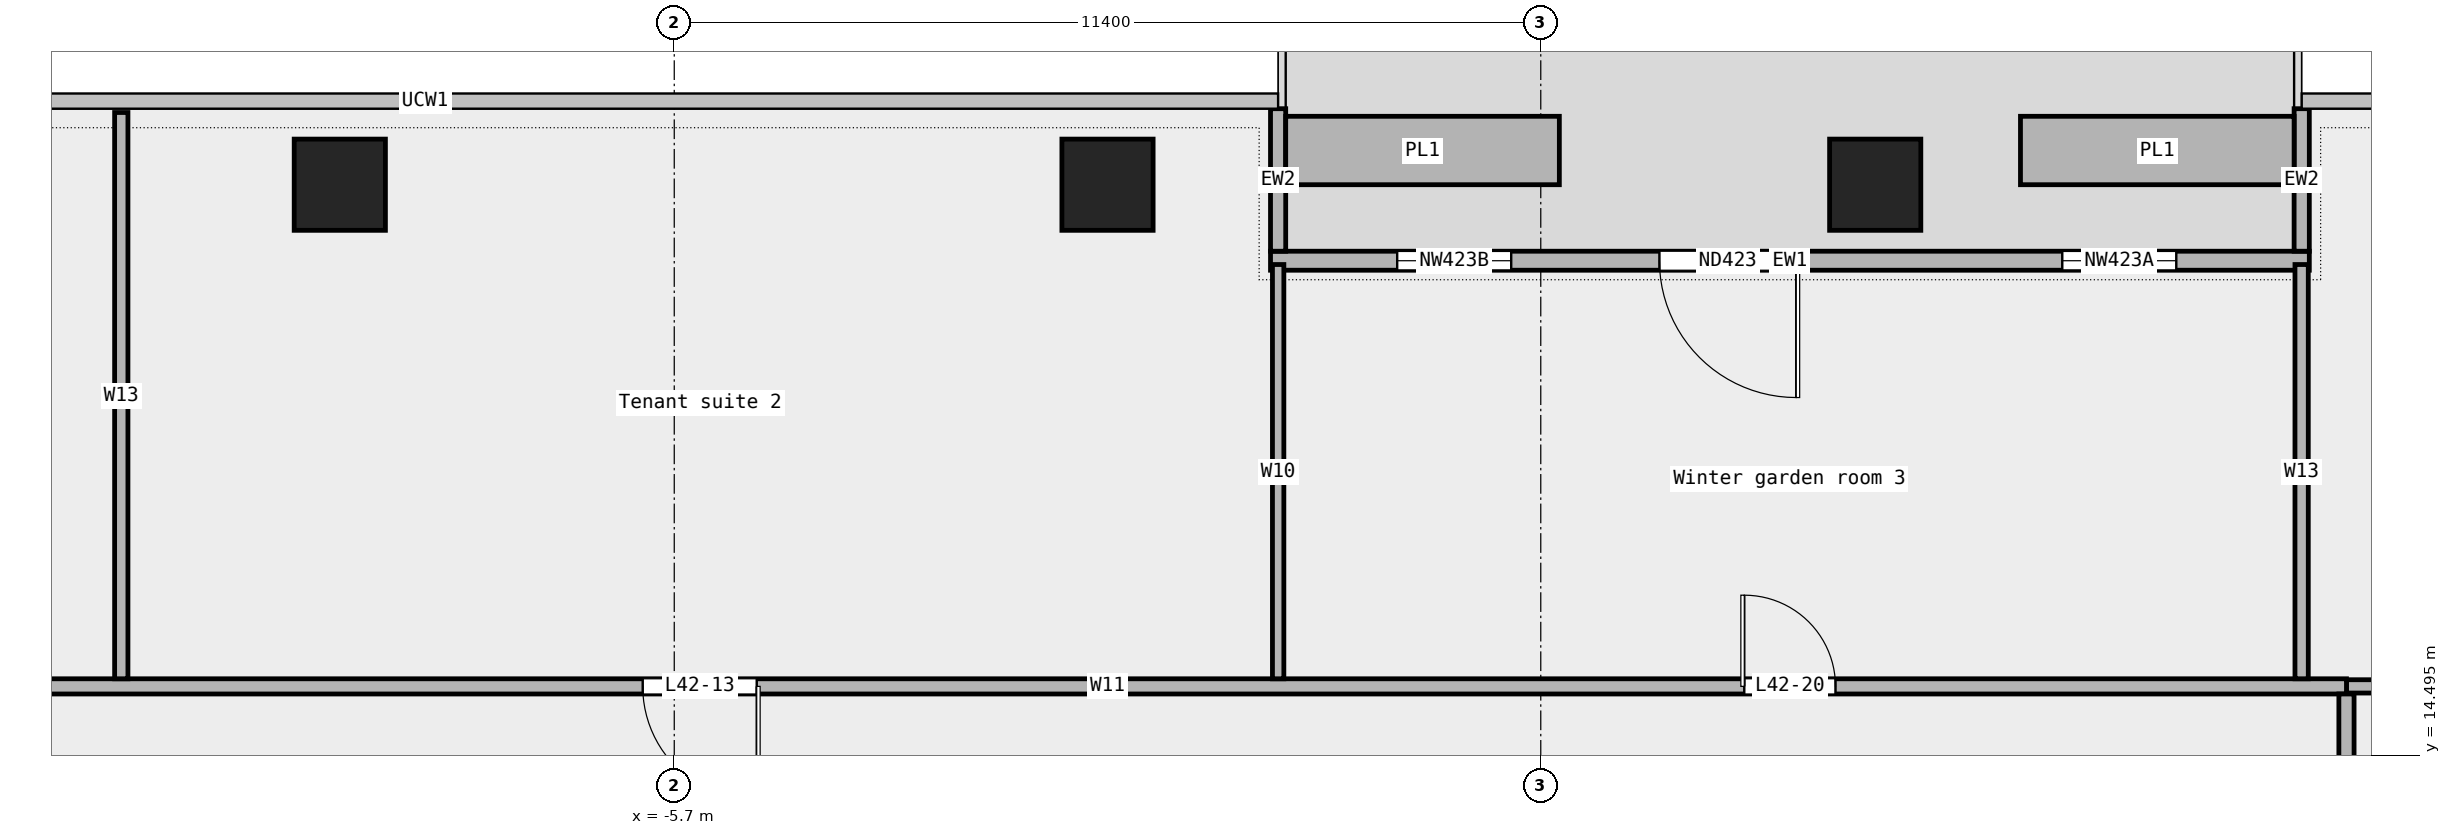
"""IFC4 building model, lengths in metres.
Left out: names, types, materials, properties, quantities, classifications, styles, units other than length and angle.
Written with IfcOpenShell. Run it as: python <this file> out.ifc"""

import sys

from ifc_helpers import new_model, si_unit, direction, frame, frame_2d, origin, origin_2d, place, context, subcontext, project, spatial, rectangle, extrude, element, fill, save


model = new_model("IFC4")
c1 = context("Model", 3, precision=1e-05, world=origin(), true_north=direction((0.0, 1.0)))
c2 = subcontext(c1, "Body", "Model", "MODEL_VIEW")
j1 = project(units=[si_unit("LENGTHUNIT", "METRE"), si_unit("PLANEANGLEUNIT", "RADIAN")], contexts=[c1])
p1 = place(None, origin())
s1 = spatial("IfcSite", under=j1, at=p1, CompositionType="ELEMENT")
p2 = place(p1, origin())
s2 = spatial("IfcBuilding", under=s1, at=p2, CompositionType="ELEMENT")
p3 = place(p2, frame((0.0, 0.0, 201.0)))
s3 = spatial("IfcBuildingStorey", under=s2, at=p3, CompositionType="ELEMENT", Elevation=201.0)
for number, where, z_axis, x_axis in (
    (1, (10.1, 22.0, 0.0), (0.0, 0.0, 1.0), (1.0, 0.0, 0.0)),
    (2, (0.0, 22.0, 0.0), (0.0, 0.0, 1.0), (1.0, 0.0, 0.0)),
    (3, (-10.1, 22.0, 0.0), (0.0, 0.0, 1.0), (1.0, 0.0, 0.0)),
):
    element("IfcColumn", number, at=place(p3, frame(where, z_axis=z_axis, x_axis=x_axis)), inside=s3, PredefinedType="COLUMN", context=c2, shape_type="SweptSolid", body=[
        extrude(rectangle(XDim=1.2, YDim=1.2, at=origin_2d()), origin(), (0.0, 0.0, 1.0), 3.4),
    ])
p4 = place(p3, frame((15.811, 21.0, 0.0), z_axis=(0.0, 0.0, 1.0), x_axis=(-1.0, 0.0, 0.0)))
e4 = element("IfcWall", 4, at=p4, inside=s3, PredefinedType="STANDARD", context=c2, shape_type="SweptSolid", body=[
    extrude(rectangle(XDim=13.667, YDim=0.25, at=frame_2d((6.833, 0.0))), origin(), (0.0, 0.0, 1.0), 3.4),
])
p5 = place(p4, frame((1.75, 0.0, 0.45)))
e5 = element("IfcOpeningElement", 5, at=p5, cuts=e4, PredefinedType="OPENING", context=c2, shape_type="SweptSolid", body=[
    extrude(rectangle(XDim=1.5, YDim=2.4, at=frame_2d((0.75, 1.2))), frame((0.0, 0.137, 0.0), z_axis=(0.0, -1.0, 0.0), x_axis=(1.0, 0.0, 0.0)), (0.0, 0.0, 1.0), 0.274),
])
p6 = place(p4, frame((6.75, 0.0, 0.0)))
e6 = element("IfcOpeningElement", 6, at=p6, cuts=e4, PredefinedType="OPENING", context=c2, shape_type="SweptSolid", body=[
    extrude(rectangle(XDim=1.8, YDim=2.4, at=frame_2d((0.9, 1.2))), frame((0.0, 0.137, 0.0), z_axis=(0.0, -1.0, 0.0), x_axis=(1.0, 0.0, 0.0)), (0.0, 0.0, 1.0), 0.274),
])
p7 = place(p4, frame((10.5, 0.0, 0.45)))
e7 = element("IfcOpeningElement", 7, at=p7, cuts=e4, PredefinedType="OPENING", context=c2, shape_type="SweptSolid", body=[
    extrude(rectangle(XDim=1.5, YDim=2.4, at=frame_2d((0.75, 1.2))), frame((0.0, 0.137, 0.0), z_axis=(0.0, -1.0, 0.0), x_axis=(1.0, 0.0, 0.0)), (0.0, 0.0, 1.0), 0.274),
])
for number, where, z_axis, x_axis in (
    (8, (15.711, 23.0, 0.0), (0.0, 0.0, 1.0), (0.0, -1.0, 0.0)),
    (9, (2.244, 23.0, 0.0), (0.0, 0.0, 1.0), (0.0, -1.0, 0.0)),
):
    element("IfcWall", number, at=place(p3, frame(where, z_axis=z_axis, x_axis=x_axis)), inside=s3, PredefinedType="STANDARD", context=c2, shape_type="SweptSolid", body=[
        extrude(rectangle(XDim=1.875, YDim=0.2, at=frame_2d((0.938, 0.0))), origin(), (0.0, 0.0, 1.0), 3.4),
    ])
for number, where, z_axis, x_axis in (
    (10, (15.611, 22.45, 0.0), (0.0, 0.0, 1.0), (-1.0, 0.0, 0.0)),
    (11, (5.944, 22.45, 0.0), (0.0, 0.0, 1.0), (-1.0, 0.0, 0.0)),
):
    element("IfcWall", number, at=place(p3, frame(where, z_axis=z_axis, x_axis=x_axis)), inside=s3, PredefinedType="STANDARD", context=c2, shape_type="SweptSolid", body=[
        extrude(rectangle(XDim=3.6, YDim=0.9, at=frame_2d((1.8, 0.0))), origin(), (0.0, 0.0, 1.0), 0.7),
    ])
p8 = place(p3, frame((16.3, 15.4, 0.0), z_axis=(0.0, 0.0, 1.0), x_axis=(1.0, 0.0, 0.0)))
e12 = element("IfcWall", 12, at=p8, inside=s3, PredefinedType="PARTITIONING", context=c2, shape_type="SweptSolid", body=[
    extrude(rectangle(XDim=3.6, YDim=0.175, at=frame_2d((1.8, 0.0))), origin(), (0.0, 0.0, 1.0), 3.4),
])
p9 = place(p3, frame((-16.3, 15.4, 0.0), z_axis=(0.0, 0.0, 1.0), x_axis=(1.0, 0.0, 0.0)))
e13 = element("IfcWall", 13, at=p9, inside=s3, PredefinedType="PARTITIONING", context=c2, shape_type="SweptSolid", body=[
    extrude(rectangle(XDim=32.6, YDim=0.2, at=frame_2d((16.3, 0.0))), origin(), (0.0, 0.0, 1.0), 3.4),
])
p10 = place(p9, frame((10.185, 0.0, 0.0)))
e14 = element("IfcOpeningElement", 14, at=p10, cuts=e13, PredefinedType="OPENING", context=c2, shape_type="SweptSolid", body=[
    extrude(rectangle(XDim=1.5, YDim=2.1, at=frame_2d((0.75, 1.05))), frame((0.0, 0.112, 0.0), z_axis=(0.0, -1.0, 0.0), x_axis=(1.0, 0.0, 0.0)), (0.0, 0.0, 1.0), 0.224),
])
p11 = place(p9, frame((1.062, 0.0, 0.0)))
e15 = element("IfcOpeningElement", 15, at=p11, cuts=e13, PredefinedType="OPENING", context=c2, shape_type="SweptSolid", body=[
    extrude(rectangle(XDim=1.2, YDim=2.1, at=frame_2d((0.6, 1.05))), frame((0.0, 0.112, 0.0), z_axis=(0.0, -1.0, 0.0), x_axis=(1.0, 0.0, 0.0)), (0.0, 0.0, 1.0), 0.224),
])
p12 = place(p9, frame((24.677, 0.0, 0.0)))
e16 = element("IfcOpeningElement", 16, at=p12, cuts=e13, PredefinedType="OPENING", context=c2, shape_type="SweptSolid", body=[
    extrude(rectangle(XDim=1.2, YDim=2.1, at=frame_2d((0.6, 1.05))), frame((0.0, 0.112, 0.0), z_axis=(0.0, -1.0, 0.0), x_axis=(1.0, 0.0, 0.0)), (0.0, 0.0, 1.0), 0.224),
])
p13 = place(p3, frame((-12.975, 15.5, 0.0), z_axis=(0.0, 0.0, 1.0), x_axis=(0.0, 1.0, 0.0)))
e17 = element("IfcWall", 17, at=p13, inside=s3, PredefinedType="PARTITIONING", context=c2, shape_type="SweptSolid", body=[
    extrude(rectangle(XDim=7.45, YDim=0.175, at=frame_2d((3.725, 0.0))), origin(), (0.0, 0.0, 1.0), 3.4),
])
p14 = place(p3, frame((2.245, 15.5, 0.0), z_axis=(0.0, 0.0, 1.0), x_axis=(0.0, 1.0, 0.0)))
e18 = element("IfcWall", 18, at=p14, inside=s3, PredefinedType="PARTITIONING", context=c2, shape_type="SweptSolid", body=[
    extrude(rectangle(XDim=5.45, YDim=0.15, at=frame_2d((2.725, 0.0))), origin(), (0.0, 0.0, 1.0), 3.4),
])
p15 = place(p3, frame((15.71, 15.5, 0.0), z_axis=(0.0, 0.0, 1.0), x_axis=(0.0, 1.0, 0.0)))
e19 = element("IfcWall", 19, at=p15, inside=s3, PredefinedType="PARTITIONING", context=c2, shape_type="SweptSolid", body=[
    extrude(rectangle(XDim=5.45, YDim=0.175, at=frame_2d((2.725, 0.0))), origin(), (0.0, 0.0, 1.0), 3.4),
])
p16 = place(p3, frame((16.3, 11.7, 0.0), z_axis=(0.0, 0.0, 1.0), x_axis=(0.0, 1.0, 0.0)))
e20 = element("IfcWall", 20, at=p16, inside=s3, PredefinedType="PARTITIONING", context=c2, shape_type="SweptSolid", body=[
    extrude(rectangle(XDim=3.6, YDim=0.2, at=frame_2d((1.8, 0.0))), origin(), (0.0, 0.0, 1.0), 3.4),
])
p17 = place(p5, origin())
e21 = element("IfcWindow", 21, at=p17, inside=s3, PartitioningType="SINGLE_PANEL", PredefinedType="WINDOW", context=c2, shape_type="SweptSolid", body=[
    extrude(rectangle(XDim=1.5, YDim=2.4, at=frame_2d((0.75, 1.2))), frame((0.0, 0.03, 0.0), z_axis=(0.0, -1.0, 0.0), x_axis=(1.0, 0.0, 0.0)), (0.0, 0.0, 1.0), 0.06),
])
fill(e5, e21)
p18 = place(p6, origin())
e22 = element("IfcDoor", 22, at=p18, inside=s3, OperationType="DOUBLE_DOOR_SINGLE_SWING", PredefinedType="DOOR", context=c2, shape_type="SweptSolid", body=[
    extrude(rectangle(XDim=1.8, YDim=2.4, at=frame_2d((0.9, 1.2))), frame((0.0, 0.025, 0.0), z_axis=(0.0, -1.0, 0.0), x_axis=(1.0, 0.0, 0.0)), (0.0, 0.0, 1.0), 0.05),
])
fill(e6, e22)
p19 = place(p7, origin())
e23 = element("IfcWindow", 23, at=p19, inside=s3, PartitioningType="SINGLE_PANEL", PredefinedType="WINDOW", context=c2, shape_type="SweptSolid", body=[
    extrude(rectangle(XDim=1.5, YDim=2.4, at=frame_2d((0.75, 1.2))), frame((0.0, 0.03, 0.0), z_axis=(0.0, -1.0, 0.0), x_axis=(1.0, 0.0, 0.0)), (0.0, 0.0, 1.0), 0.06),
])
fill(e7, e23)
p20 = place(p10, origin())
e24 = element("IfcDoor", 24, at=p20, inside=s3, OperationType="DOUBLE_DOOR_SINGLE_SWING", PredefinedType="DOOR", context=c2, shape_type="SweptSolid", body=[
    extrude(rectangle(XDim=1.5, YDim=2.1, at=frame_2d((0.75, 1.05))), frame((0.0, 0.025, 0.0), z_axis=(0.0, -1.0, 0.0), x_axis=(1.0, 0.0, 0.0)), (0.0, 0.0, 1.0), 0.05),
])
fill(e14, e24)
p21 = place(p12, origin())
e25 = element("IfcDoor", 25, at=p21, inside=s3, OperationType="SINGLE_SWING_LEFT", PredefinedType="DOOR", context=c2, shape_type="SweptSolid", body=[
    extrude(rectangle(XDim=1.2, YDim=2.1, at=frame_2d((0.6, 1.05))), frame((0.0, 0.025, 0.0), z_axis=(0.0, -1.0, 0.0), x_axis=(1.0, 0.0, 0.0)), (0.0, 0.0, 1.0), 0.05),
])
fill(e16, e25)
save(model, sys.argv[1])
